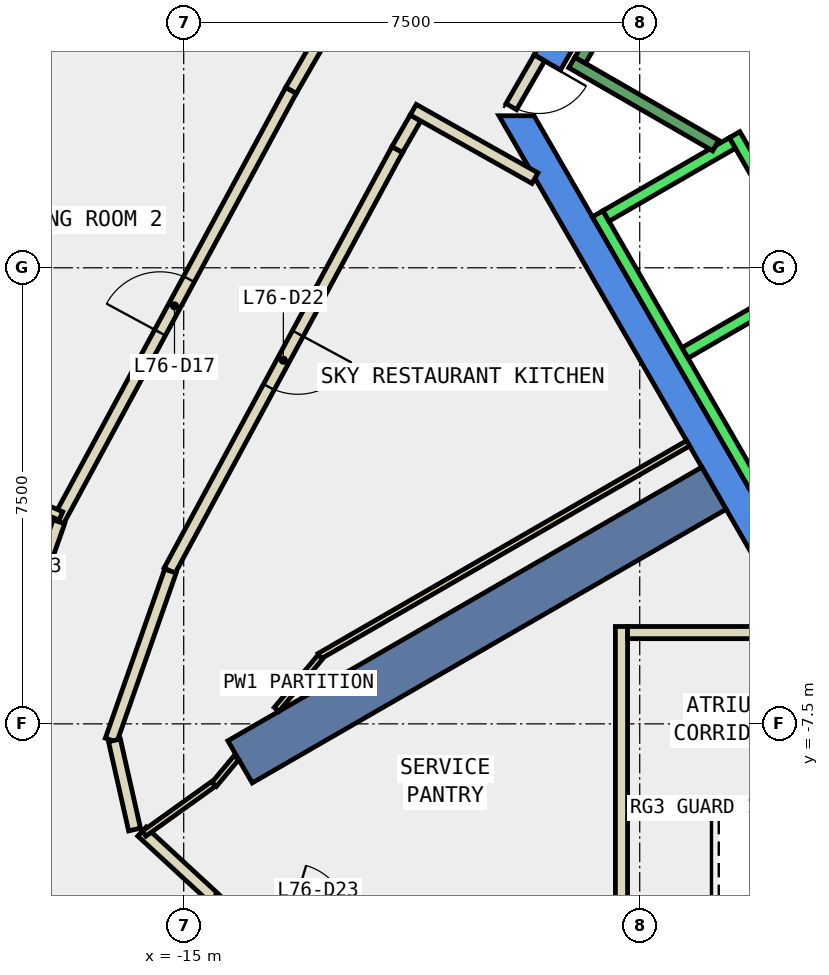
"""IFC4 building model, lengths in metres.
Left out: names, types, materials, properties, quantities, classifications, styles, units other than length and angle.
Written with IfcOpenShell. Run it as: python <this file> out.ifc"""

import sys

from ifc_helpers import new_model, si_unit, direction, frame, frame_2d, origin, place, context, subcontext, project, spatial, polyline, rectangle, outline, extrude, element, fill, save


model = new_model("IFC4")
c1 = context("Model", 3, precision=1e-05, world=origin(), true_north=direction((0.0, 1.0)))
c2 = subcontext(c1, "Body", "Model", "MODEL_VIEW")
j1 = project(units=[si_unit("LENGTHUNIT", "METRE"), si_unit("PLANEANGLEUNIT", "RADIAN")], contexts=[c1])
p1 = place(None, origin())
s1 = spatial("IfcSite", under=j1, at=p1, CompositionType="ELEMENT")
p2 = place(p1, origin())
s2 = spatial("IfcBuilding", under=s1, at=p2, CompositionType="ELEMENT")
p3 = place(p2, frame((0.0, 0.0, 322.4)))
s3 = spatial("IfcBuildingStorey", under=s2, at=p3, CompositionType="ELEMENT", Elevation=322.4)
p4 = place(p3, frame((0.0, 0.0, -0.34)))
e1 = element("IfcWall", 1, at=p4, inside=s3, PredefinedType="SHEAR", context=c2, shape_type="SweptSolid", body=[
    extrude(outline(polyline([(-9.236, 3.502), (-8.803, 3.253), (-4.619, 10.5), (-4.907, 11.0), (-9.236, 3.502)])), origin(), (0.0, 0.0, 1.0), 3.34),
])
p5 = place(p3, frame((0.0, 0.0, -0.34)))
e2 = element("IfcWall", 2, at=p5, inside=s3, PredefinedType="SHEAR", context=c2, shape_type="SweptSolid", body=[
    extrude(outline(polyline([(-9.815, 2.5), (-4.907, -6.0), (-4.619, -5.5), (-9.238, 2.5), (-9.815, 2.5)])), origin(), (0.0, 0.0, 1.0), 3.34),
])
p6 = place(p3, frame((-6.279, -3.625, -0.34), z_axis=(0.0, 0.0, 1.0), x_axis=(-0.866017533419, -0.500013631625, 0.0)))
e3 = element("IfcWall", 3, at=p6, inside=s3, PredefinedType="SHEAR", context=c2, shape_type="SweptSolid", body=[
    extrude(rectangle(XDim=9.0, YDim=0.8, at=frame_2d((4.5, 0.0))), origin(), (0.0, 0.0, 1.0), 3.34),
])
p7 = place(p3, frame((-11.188, 2.464, 0.0), z_axis=(0.0, 0.0, 1.0), x_axis=(-0.499406844493, -0.866367591542, 0.0)))
e4 = element("IfcWall", 4, at=p7, inside=s3, PredefinedType="PARTITIONING", context=c2, shape_type="SweptSolid", body=[
    extrude(rectangle(XDim=0.603, YDim=0.2, at=frame_2d((0.301, 0.0))), origin(), (0.0, 0.0, 1.0), 3.0),
])
p8 = place(p3, frame((-11.489, 1.942, 0.0), z_axis=(0.0, 0.0, 1.0), x_axis=(-0.475643534049, -0.879638123615, 0.0)))
e5 = element("IfcWall", 5, at=p8, inside=s3, PredefinedType="PARTITIONING", context=c2, shape_type="SweptSolid", body=[
    extrude(rectangle(XDim=7.871, YDim=0.2, at=frame_2d((3.936, 0.0))), origin(), (0.0, 0.0, 1.0), 3.0),
])
p9 = place(p8, frame((3.436, 0.0, 0.0)))
e6 = element("IfcOpeningElement", 6, at=p9, cuts=e5, PredefinedType="OPENING", context=c2, shape_type="SweptSolid", body=[
    extrude(rectangle(XDim=1.0, YDim=2.1, at=frame_2d((0.5, 1.05))), frame((0.0, 0.11, 0.0), z_axis=(0.0, -1.0, 0.0), x_axis=(1.0, 0.0, 0.0)), (0.0, 0.0, 1.0), 0.22),
])
p10 = place(p3, frame((-15.219, -4.988, 0.0), z_axis=(0.0, 0.0, 1.0), x_axis=(-0.330981563235, -0.943637220969, 0.0)))
e7 = element("IfcWall", 7, at=p10, inside=s3, PredefinedType="PARTITIONING", context=c2, shape_type="SweptSolid", body=[
    extrude(rectangle(XDim=2.946, YDim=0.2, at=frame_2d((1.473, 0.0))), origin(), (0.0, 0.0, 1.0), 3.0),
])
p11 = place(p3, frame((-16.139, -7.772, 0.0), z_axis=(0.0, 0.0, 1.0), x_axis=(0.220111291919, -0.975474766034, 0.0)))
e8 = element("IfcWall", 8, at=p11, inside=s3, PredefinedType="PARTITIONING", context=c2, shape_type="SweptSolid", body=[
    extrude(rectangle(XDim=1.503, YDim=0.2, at=frame_2d((0.751, 0.0))), origin(), (0.0, 0.0, 1.0), 3.0),
])
p12 = place(p3, frame((-9.223, 1.474, 0.0), z_axis=(0.0, 0.0, 1.0), x_axis=(-0.871623785844, 0.490175454251, 0.0)))
e9 = element("IfcWall", 9, at=p12, inside=s3, PredefinedType="PARTITIONING", context=c2, shape_type="SweptSolid", body=[
    extrude(rectangle(XDim=2.297, YDim=0.2, at=frame_2d((1.148, 0.0))), origin(), (0.0, 0.0, 1.0), 3.0),
])
p13 = place(p3, frame((-15.687, -9.272, 0.0), z_axis=(0.0, 0.0, 1.0), x_axis=(0.734946370973, -0.67812523312, 0.0)))
e10 = element("IfcWall", 10, at=p13, inside=s3, PredefinedType="PARTITIONING", context=c2, shape_type="SweptSolid", body=[
    extrude(rectangle(XDim=1.637, YDim=0.2, at=frame_2d((0.818, 0.0))), origin(), (0.0, 0.0, 1.0), 3.0),
])
p14 = place(p3, frame((-17.068, -4.17, 0.0), z_axis=(0.0, 0.0, 1.0), x_axis=(0.475681790703, 0.879617436158, 0.0)))
e11 = element("IfcWall", 11, at=p14, inside=s3, PredefinedType="PARTITIONING", context=c2, shape_type="SweptSolid", body=[
    extrude(rectangle(XDim=8.058, YDim=0.2, at=frame_2d((4.029, 0.0))), origin(), (0.0, 0.0, 1.0), 3.0),
])
p15 = place(p14, frame((3.529, 0.0, 0.0)))
e12 = element("IfcOpeningElement", 12, at=p15, cuts=e11, PredefinedType="OPENING", context=c2, shape_type="SweptSolid", body=[
    extrude(rectangle(XDim=1.0, YDim=2.1, at=frame_2d((0.5, 1.05))), frame((0.0, 0.11, 0.0), z_axis=(0.0, -1.0, 0.0), x_axis=(1.0, 0.0, 0.0)), (0.0, 0.0, 1.0), 0.22),
])
p16 = place(p3, frame((-13.235, 2.918, 0.0), z_axis=(0.0, 0.0, 1.0), x_axis=(0.49992599743, 0.866068124973, 0.0)))
e13 = element("IfcWall", 13, at=p16, inside=s3, PredefinedType="PARTITIONING", context=c2, shape_type="SweptSolid", body=[
    extrude(rectangle(XDim=4.015, YDim=0.2, at=frame_2d((2.007, 0.0))), origin(), (0.0, 0.0, 1.0), 3.0),
])
p17 = place(p3, frame((-15.352, -12.303, 0.0), z_axis=(0.0, 0.0, 1.0), x_axis=(-0.734786003021, 0.67829899732, 0.0)))
e14 = element("IfcWall", 14, at=p17, inside=s3, PredefinedType="PARTITIONING", context=c2, shape_type="SweptSolid", body=[
    extrude(rectangle(XDim=3.22, YDim=0.2, at=frame_2d((1.61, 0.0))), origin(), (0.0, 0.0, 1.0), 3.0),
])
p18 = place(p3, frame((-18.271, -7.648, 0.0), z_axis=(0.0, 0.0, 1.0), x_axis=(0.33112192567, 0.943587977001, 0.0)))
e15 = element("IfcWall", 15, at=p18, inside=s3, PredefinedType="PARTITIONING", context=c2, shape_type="SweptSolid", body=[
    extrude(rectangle(XDim=3.678, YDim=0.2, at=frame_2d((1.839, 0.0))), origin(), (0.0, 0.0, 1.0), 3.0),
])
p19 = place(p18, frame((1.339, 0.0, 0.0)))
e16 = element("IfcOpeningElement", 16, at=p19, cuts=e15, PredefinedType="OPENING", context=c2, shape_type="SweptSolid", body=[
    extrude(rectangle(XDim=1.0, YDim=2.1, at=frame_2d((0.5, 1.05))), frame((0.0, 0.11, 0.0), z_axis=(0.0, -1.0, 0.0), x_axis=(1.0, 0.0, 0.0)), (0.0, 0.0, 1.0), 0.22),
])
p20 = place(p3, frame((-7.8, -11.624, 0.0), z_axis=(0.0, 0.0, 1.0), x_axis=(0.0, 1.0, 0.0)))
e17 = element("IfcWall", 17, at=p20, inside=s3, PredefinedType="PARTITIONING", context=c2, shape_type="SweptSolid", body=[
    extrude(rectangle(XDim=5.725, YDim=0.2, at=frame_2d((2.863, 0.0))), origin(), (0.0, 0.0, 1.0), 3.0),
])
p21 = place(p3, frame((-7.7, -5.999, 0.0), z_axis=(0.0, 0.0, 1.0), x_axis=(1.0, 0.0, 0.0)))
e18 = element("IfcWall", 18, at=p21, inside=s3, PredefinedType="PARTITIONING", context=c2, shape_type="SweptSolid", body=[
    extrude(rectangle(XDim=2.792, YDim=0.2, at=frame_2d((1.396, 0.0))), origin(), (0.0, 0.0, 1.0), 3.0),
])
p22 = place(p3, frame((-6.705, -2.887, 0.0), z_axis=(0.0, 0.0, 1.0), x_axis=(-0.866001397039, -0.500041578597, 0.0)))
e19 = element("IfcWall", 19, at=p22, inside=s3, PredefinedType="PARTITIONING", context=c2, shape_type="SweptSolid", body=[
    extrude(rectangle(XDim=6.998, YDim=0.1, at=frame_2d((3.499, 0.0))), origin(), (0.0, 0.0, 1.0), 3.0),
])
p23 = place(p3, frame((-12.753, -6.399, 0.0), z_axis=(0.0, 0.0, 1.0), x_axis=(-0.640077503072, -0.768310347491, 0.0)))
e20 = element("IfcWall", 20, at=p23, inside=s3, PredefinedType="PARTITIONING", context=c2, shape_type="SweptSolid", body=[
    extrude(rectangle(XDim=1.123, YDim=0.1, at=frame_2d((0.562, 0.0))), origin(), (0.0, 0.0, 1.0), 3.0),
])
p24 = place(p3, frame((-14.507, -8.486, 0.0), z_axis=(0.0, 0.0, 1.0), x_axis=(-0.812782900134, -0.582566697684, 0.0)))
e21 = element("IfcWall", 21, at=p24, inside=s3, PredefinedType="PARTITIONING", context=c2, shape_type="SweptSolid", body=[
    extrude(rectangle(XDim=1.407, YDim=0.1, at=frame_2d((0.704, 0.0))), origin(), (0.0, 0.0, 1.0), 3.0),
])
p25 = place(p3, frame((-17.02, -4.082, 0.0), z_axis=(0.0, 0.0, 1.0), x_axis=(-0.914599611743, 0.404360668462, 0.0)))
e22 = element("IfcWall", 22, at=p25, inside=s3, PredefinedType="PARTITIONING", context=c2, shape_type="SweptSolid", body=[
    extrude(rectangle(XDim=4.296, YDim=0.15, at=frame_2d((2.148, 0.0))), origin(), (0.0, 0.0, 1.0), 3.0),
])
p26 = place(p3, frame((-9.15, 3.452, 0.0), z_axis=(0.0, 0.0, 1.0), x_axis=(-0.500079945886, -0.865979242085, 0.0)))
e23 = element("IfcWall", 23, at=p26, inside=s3, PredefinedType="PARTITIONING", context=c2, shape_type="SweptSolid", body=[
    extrude(rectangle(XDim=0.926, YDim=0.2, at=frame_2d((0.463, 0.0))), origin(), (0.0, 0.0, 1.0), 2.4),
])
p27 = place(p26, frame((0.017, 0.0, 0.0)))
e24 = element("IfcOpeningElement", 24, at=p27, cuts=e23, PredefinedType="OPENING", context=c2, shape_type="SweptSolid", body=[
    extrude(rectangle(XDim=0.9, YDim=2.1, at=frame_2d((0.45, 1.05))), frame((0.0, 0.11, 0.0), z_axis=(0.0, -1.0, 0.0), x_axis=(1.0, 0.0, 0.0)), (0.0, 0.0, 1.0), 0.22),
])
p28 = place(p3, frame((-14.133, -8.056, 0.0), z_axis=(0.0, 0.0, 1.0), x_axis=(-0.640142394154, -0.768256282244, 0.0)))
e25 = element("IfcWall", 25, at=p28, inside=s3, PredefinedType="PARTITIONING", context=c2, shape_type="SweptSolid", body=[
    extrude(rectangle(XDim=0.572, YDim=0.1, at=frame_2d((0.286, 0.0))), origin(), (0.0, 0.0, 1.0), 3.0),
])
p29 = place(p3, frame((-5.94, 2.188, 0.0), z_axis=(0.0, 0.0, 1.0), x_axis=(0.500034260056, -0.866005622828, 0.0)))
e26 = element("IfcWall", 26, at=p29, inside=s3, PredefinedType="STANDARD", context=c2, shape_type="SweptSolid", body=[
    extrude(rectangle(XDim=5.399, YDim=0.2, at=frame_2d((2.7, 0.0))), origin(), (0.0, 0.0, 1.0), 3.0),
])
p30 = place(p29, frame((3.075, 0.0, 0.0)))
e27 = element("IfcOpeningElement", 27, at=p30, cuts=e26, PredefinedType="OPENING", context=c2, shape_type="SweptSolid", body=[
    extrude(rectangle(XDim=1.1, YDim=2.1, at=frame_2d((0.55, 1.05))), frame((0.0, 0.11, 0.0), z_axis=(0.0, -1.0, 0.0), x_axis=(1.0, 0.0, 0.0)), (0.0, 0.0, 1.0), 0.22),
])
p31 = place(p29, frame((1.225, 0.0, 0.0)))
e28 = element("IfcOpeningElement", 28, at=p31, cuts=e26, PredefinedType="OPENING", context=c2, shape_type="SweptSolid", body=[
    extrude(rectangle(XDim=1.1, YDim=2.1, at=frame_2d((0.55, 1.05))), frame((0.0, 0.11, 0.0), z_axis=(0.0, -1.0, 0.0), x_axis=(1.0, 0.0, 0.0)), (0.0, 0.0, 1.0), 0.22),
])
p32 = place(p3, frame((-8.192, 0.888, 0.0), z_axis=(0.0, 0.0, 1.0), x_axis=(0.500034260056, -0.866005622828, 0.0)))
e29 = element("IfcWall", 29, at=p32, inside=s3, PredefinedType="STANDARD", context=c2, shape_type="SweptSolid", body=[
    extrude(rectangle(XDim=5.399, YDim=0.2, at=frame_2d((2.7, 0.0))), origin(), (0.0, 0.0, 1.0), 3.0),
])
for number, where, z_axis, x_axis in (
    (30, (-5.977, 2.052, 0.0), (0.0, 0.0, 1.0), (-0.866, -0.5, 0.0)),
    (31, (-4.677, -0.2, 0.0), (0.0, 0.0, 1.0), (-0.866, -0.5, 0.0)),
):
    element("IfcWall", number, at=place(p3, frame(where, z_axis=z_axis, x_axis=x_axis)), inside=s3, PredefinedType="STANDARD", context=c2, shape_type="SweptSolid", body=[
        extrude(rectangle(XDim=2.399, YDim=0.2, at=frame_2d((1.2, 0.0))), origin(), (0.0, 0.0, 1.0), 3.0),
    ])
p33 = place(p3, frame((-6.25, 2.01, 0.0), z_axis=(0.0, 0.0, 1.0), x_axis=(-0.86611865017, 0.499838457731, 0.0)))
e32 = element("IfcWall", 32, at=p33, inside=s3, PredefinedType="STANDARD", context=c2, shape_type="SweptSolid", body=[
    extrude(rectangle(XDim=2.733, YDim=0.2, at=frame_2d((1.366, 0.0))), origin(), (0.0, 0.0, 1.0), 3.0),
])
p34 = place(p3, frame((-5.03, 9.388, 0.0), z_axis=(0.0, 0.0, 1.0), x_axis=(-0.499978703459, -0.866037698999, 0.0)))
e33 = element("IfcWall", 33, at=p34, inside=s3, PredefinedType="STANDARD", context=c2, shape_type="SweptSolid", body=[
    extrude(rectangle(XDim=6.9, YDim=0.2, at=frame_2d((3.45, 0.0))), origin(), (0.0, 0.0, 1.0), 3.0),
])
p35 = place(p15, origin())
e34 = element("IfcDoor", 34, at=p35, inside=s3, OperationType="SINGLE_SWING_LEFT", PredefinedType="DOOR", context=c2, shape_type="SweptSolid", body=[
    extrude(rectangle(XDim=1.0, YDim=2.1, at=frame_2d((0.5, 1.05))), frame((0.0, 0.025, 0.0), z_axis=(0.0, -1.0, 0.0), x_axis=(1.0, 0.0, 0.0)), (0.0, 0.0, 1.0), 0.05),
])
fill(e12, e34)
p36 = place(p9, origin())
e35 = element("IfcDoor", 35, at=p36, inside=s3, OperationType="SINGLE_SWING_LEFT", PredefinedType="DOOR", context=c2, shape_type="SweptSolid", body=[
    extrude(rectangle(XDim=1.0, YDim=2.1, at=frame_2d((0.5, 1.05))), frame((0.0, 0.025, 0.0), z_axis=(0.0, -1.0, 0.0), x_axis=(1.0, 0.0, 0.0)), (0.0, 0.0, 1.0), 0.05),
])
fill(e6, e35)
p37 = place(p27, origin())
e36 = element("IfcDoor", 36, at=p37, inside=s3, OperationType="SINGLE_SWING_LEFT", PredefinedType="DOOR", context=c2, shape_type="SweptSolid", body=[
    extrude(rectangle(XDim=0.9, YDim=2.1, at=frame_2d((0.45, 1.05))), frame((0.0, 0.025, 0.0), z_axis=(0.0, -1.0, 0.0), x_axis=(1.0, 0.0, 0.0)), (0.0, 0.0, 1.0), 0.05),
])
fill(e24, e36)
save(model, sys.argv[1])
